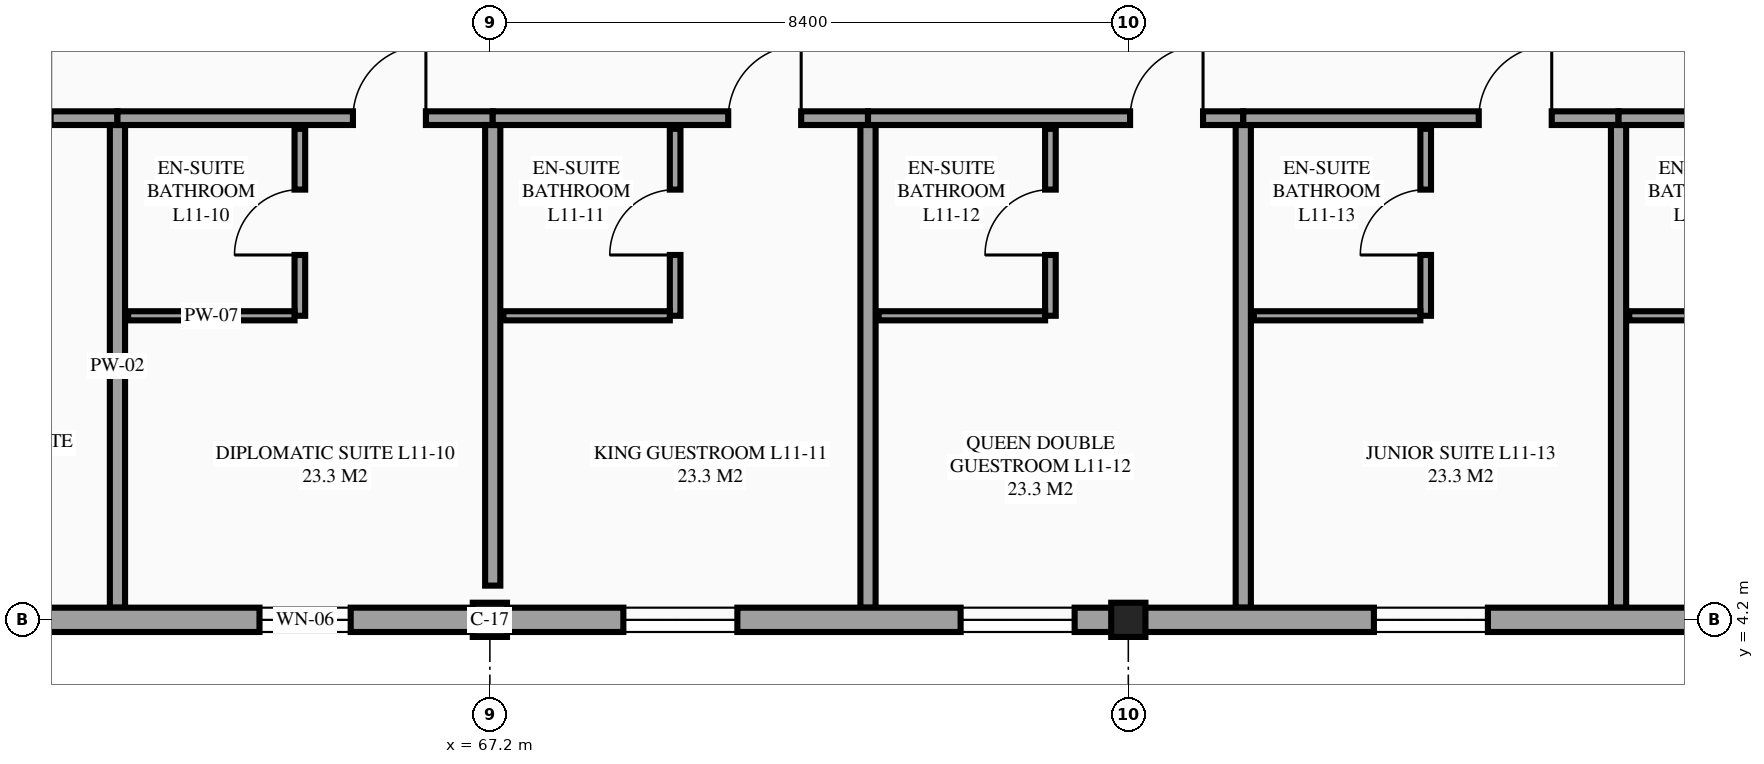
"""IFC4 building model, lengths in metres.
Left out: names, types, materials, properties, quantities, classifications, styles, units other than length and angle.
Written with IfcOpenShell. Run it as: python <this file> out.ifc"""

import sys

from ifc_helpers import new_model, si_unit, direction, frame, frame_2d, origin, origin_2d, place, context, subcontext, project, spatial, rectangle, extrude, element, fill, save


model = new_model("IFC4")
c1 = context("Model", 3, precision=1e-05, world=origin(), true_north=direction((0.0, 1.0)))
c2 = subcontext(c1, "Body", "Model", "MODEL_VIEW")
j1 = project(units=[si_unit("LENGTHUNIT", "METRE"), si_unit("PLANEANGLEUNIT", "RADIAN")], contexts=[c1])
p1 = place(None, origin())
s1 = spatial("IfcSite", under=j1, at=p1, CompositionType="ELEMENT")
p2 = place(p1, origin())
s2 = spatial("IfcBuilding", under=s1, at=p2, CompositionType="ELEMENT")
p3 = place(p2, frame((0.0, 0.0, 43.5)))
s3 = spatial("IfcBuildingStorey", under=s2, at=p3, CompositionType="ELEMENT", Elevation=43.5)
for number, where, z_axis, x_axis in (
    (1, (67.2, 4.2, 0.0), (0.0, 0.0, 1.0), (1.0, 0.0, 0.0)),
    (2, (75.6, 4.2, 0.0), (0.0, 0.0, 1.0), (1.0, 0.0, 0.0)),
):
    element("IfcColumn", number, at=place(p3, frame(where, z_axis=z_axis, x_axis=x_axis)), inside=s3, PredefinedType="COLUMN", context=c2, shape_type="SweptSolid", body=[
        extrude(rectangle(XDim=0.45, YDim=0.45, at=origin_2d()), origin(), (0.0, 0.0, 1.0), 3.6),
    ])
p4 = place(p3, frame((57.363, 10.8, 0.0), z_axis=(0.0, 0.0, 1.0), x_axis=(1.0, 0.0, 0.0)))
e3 = element("IfcWall", 3, at=p4, inside=s3, PredefinedType="PARTITIONING", context=c2, shape_type="SweptSolid", body=[
    extrude(rectangle(XDim=4.938, YDim=0.18, at=frame_2d((2.469, 0.0))), origin(), (0.0, 0.0, 1.0), 3.355),
])
p5 = place(p4, frame((3.098, 0.0, 0.0)))
e4 = element("IfcOpeningElement", 4, at=p5, cuts=e3, PredefinedType="OPENING", context=c2, shape_type="SweptSolid", body=[
    extrude(rectangle(XDim=0.96, YDim=2.15, at=frame_2d((0.48, 1.075))), frame((0.0, 0.1, 0.0), z_axis=(0.0, -1.0, 0.0), x_axis=(1.0, 0.0, 0.0)), (0.0, 0.0, 1.0), 0.2),
])
p6 = place(p3, frame((62.3, 4.36, 0.0), z_axis=(0.0, 0.0, 1.0), x_axis=(0.0, 1.0, 0.0)))
e5 = element("IfcWall", 5, at=p6, inside=s3, PredefinedType="PARTITIONING", context=c2, shape_type="SweptSolid", body=[
    extrude(rectangle(XDim=6.35, YDim=0.2, at=frame_2d((3.175, 0.0))), origin(), (0.0, 0.0, 1.0), 3.355),
])
p7 = place(p3, frame((62.3, 10.8, 0.0), z_axis=(0.0, 0.0, 1.0), x_axis=(1.0, 0.0, 0.0)))
e6 = element("IfcWall", 6, at=p7, inside=s3, PredefinedType="PARTITIONING", context=c2, shape_type="SweptSolid", body=[
    extrude(rectangle(XDim=4.938, YDim=0.18, at=frame_2d((2.469, 0.0))), origin(), (0.0, 0.0, 1.0), 3.355),
])
p8 = place(p7, frame((3.098, 0.0, 0.0)))
e7 = element("IfcOpeningElement", 7, at=p8, cuts=e6, PredefinedType="OPENING", context=c2, shape_type="SweptSolid", body=[
    extrude(rectangle(XDim=0.96, YDim=2.15, at=frame_2d((0.48, 1.075))), frame((0.0, 0.1, 0.0), z_axis=(0.0, -1.0, 0.0), x_axis=(1.0, 0.0, 0.0)), (0.0, 0.0, 1.0), 0.2),
])
p9 = place(p3, frame((67.238, 4.65, 0.0), z_axis=(0.0, 0.0, 1.0), x_axis=(0.0, 1.0, 0.0)))
e8 = element("IfcWall", 8, at=p9, inside=s3, PredefinedType="PARTITIONING", context=c2, shape_type="SweptSolid", body=[
    extrude(rectangle(XDim=6.06, YDim=0.2, at=frame_2d((3.03, 0.0))), origin(), (0.0, 0.0, 1.0), 2.41),
])
p10 = place(p3, frame((64.7, 8.2, 0.0), z_axis=(0.0, 0.0, 1.0), x_axis=(0.0, 1.0, 0.0)))
e9 = element("IfcWall", 9, at=p10, inside=s3, PredefinedType="PARTITIONING", context=c2, shape_type="SweptSolid", body=[
    extrude(rectangle(XDim=2.46, YDim=0.14, at=frame_2d((1.23, 0.0))), origin(), (0.0, 0.0, 1.0), 3.355),
])
p11 = place(p10, frame((0.8, 0.0, 0.0)))
e10 = element("IfcOpeningElement", 10, at=p11, cuts=e9, PredefinedType="OPENING", context=c2, shape_type="SweptSolid", body=[
    extrude(rectangle(XDim=0.86, YDim=2.1, at=frame_2d((0.43, 1.05))), frame((0.0, 0.08, 0.0), z_axis=(0.0, -1.0, 0.0), x_axis=(1.0, 0.0, 0.0)), (0.0, 0.0, 1.0), 0.16),
])
p12 = place(p3, frame((62.44, 8.2, 0.0), z_axis=(0.0, 0.0, 1.0), x_axis=(1.0, 0.0, 0.0)))
e11 = element("IfcWall", 11, at=p12, inside=s3, PredefinedType="PARTITIONING", context=c2, shape_type="SweptSolid", body=[
    extrude(rectangle(XDim=2.19, YDim=0.12, at=frame_2d((1.095, 0.0))), origin(), (0.0, 0.0, 1.0), 3.355),
])
p13 = place(p3, frame((67.238, 10.8, 0.0), z_axis=(0.0, 0.0, 1.0), x_axis=(1.0, 0.0, 0.0)))
e12 = element("IfcWall", 12, at=p13, inside=s3, PredefinedType="PARTITIONING", context=c2, shape_type="SweptSolid", body=[
    extrude(rectangle(XDim=4.938, YDim=0.18, at=frame_2d((2.469, 0.0))), origin(), (0.0, 0.0, 1.0), 3.355),
])
p14 = place(p13, frame((3.098, 0.0, 0.0)))
e13 = element("IfcOpeningElement", 13, at=p14, cuts=e12, PredefinedType="OPENING", context=c2, shape_type="SweptSolid", body=[
    extrude(rectangle(XDim=0.96, YDim=2.15, at=frame_2d((0.48, 1.075))), frame((0.0, 0.1, 0.0), z_axis=(0.0, -1.0, 0.0), x_axis=(1.0, 0.0, 0.0)), (0.0, 0.0, 1.0), 0.2),
])
p15 = place(p3, frame((72.175, 4.36, 0.0), z_axis=(0.0, 0.0, 1.0), x_axis=(0.0, 1.0, 0.0)))
e14 = element("IfcWall", 14, at=p15, inside=s3, PredefinedType="PARTITIONING", context=c2, shape_type="SweptSolid", body=[
    extrude(rectangle(XDim=6.35, YDim=0.2, at=frame_2d((3.175, 0.0))), origin(), (0.0, 0.0, 1.0), 3.355),
])
p16 = place(p3, frame((69.637, 8.2, 0.0), z_axis=(0.0, 0.0, 1.0), x_axis=(0.0, 1.0, 0.0)))
e15 = element("IfcWall", 15, at=p16, inside=s3, PredefinedType="PARTITIONING", context=c2, shape_type="SweptSolid", body=[
    extrude(rectangle(XDim=2.46, YDim=0.14, at=frame_2d((1.23, 0.0))), origin(), (0.0, 0.0, 1.0), 3.355),
])
p17 = place(p16, frame((0.8, 0.0, 0.0)))
e16 = element("IfcOpeningElement", 16, at=p17, cuts=e15, PredefinedType="OPENING", context=c2, shape_type="SweptSolid", body=[
    extrude(rectangle(XDim=0.86, YDim=2.1, at=frame_2d((0.43, 1.05))), frame((0.0, 0.08, 0.0), z_axis=(0.0, -1.0, 0.0), x_axis=(1.0, 0.0, 0.0)), (0.0, 0.0, 1.0), 0.16),
])
p18 = place(p3, frame((67.377, 8.2, 0.0), z_axis=(0.0, 0.0, 1.0), x_axis=(1.0, 0.0, 0.0)))
e17 = element("IfcWall", 17, at=p18, inside=s3, PredefinedType="PARTITIONING", context=c2, shape_type="SweptSolid", body=[
    extrude(rectangle(XDim=2.19, YDim=0.12, at=frame_2d((1.095, 0.0))), origin(), (0.0, 0.0, 1.0), 3.355),
])
p19 = place(p3, frame((72.175, 10.8, 0.0), z_axis=(0.0, 0.0, 1.0), x_axis=(1.0, 0.0, 0.0)))
e18 = element("IfcWall", 18, at=p19, inside=s3, PredefinedType="PARTITIONING", context=c2, shape_type="SweptSolid", body=[
    extrude(rectangle(XDim=4.938, YDim=0.18, at=frame_2d((2.469, 0.0))), origin(), (0.0, 0.0, 1.0), 3.355),
])
p20 = place(p19, frame((3.448, 0.0, 0.0)))
e19 = element("IfcOpeningElement", 19, at=p20, cuts=e18, PredefinedType="OPENING", context=c2, shape_type="SweptSolid", body=[
    extrude(rectangle(XDim=0.96, YDim=2.15, at=frame_2d((0.48, 1.075))), frame((0.0, 0.1, 0.0), z_axis=(0.0, -1.0, 0.0), x_axis=(1.0, 0.0, 0.0)), (0.0, 0.0, 1.0), 0.2),
])
p21 = place(p3, frame((77.113, 4.36, 0.0), z_axis=(0.0, 0.0, 1.0), x_axis=(0.0, 1.0, 0.0)))
e20 = element("IfcWall", 20, at=p21, inside=s3, PredefinedType="PARTITIONING", context=c2, shape_type="SweptSolid", body=[
    extrude(rectangle(XDim=6.35, YDim=0.2, at=frame_2d((3.175, 0.0))), origin(), (0.0, 0.0, 1.0), 3.355),
])
p22 = place(p3, frame((74.575, 8.2, 0.0), z_axis=(0.0, 0.0, 1.0), x_axis=(0.0, 1.0, 0.0)))
e21 = element("IfcWall", 21, at=p22, inside=s3, PredefinedType="PARTITIONING", context=c2, shape_type="SweptSolid", body=[
    extrude(rectangle(XDim=2.46, YDim=0.14, at=frame_2d((1.23, 0.0))), origin(), (0.0, 0.0, 1.0), 3.355),
])
p23 = place(p22, frame((0.8, 0.0, 0.0)))
e22 = element("IfcOpeningElement", 22, at=p23, cuts=e21, PredefinedType="OPENING", context=c2, shape_type="SweptSolid", body=[
    extrude(rectangle(XDim=0.86, YDim=2.1, at=frame_2d((0.43, 1.05))), frame((0.0, 0.08, 0.0), z_axis=(0.0, -1.0, 0.0), x_axis=(1.0, 0.0, 0.0)), (0.0, 0.0, 1.0), 0.16),
])
p24 = place(p3, frame((72.315, 8.2, 0.0), z_axis=(0.0, 0.0, 1.0), x_axis=(1.0, 0.0, 0.0)))
e23 = element("IfcWall", 23, at=p24, inside=s3, PredefinedType="PARTITIONING", context=c2, shape_type="SweptSolid", body=[
    extrude(rectangle(XDim=2.19, YDim=0.12, at=frame_2d((1.095, 0.0))), origin(), (0.0, 0.0, 1.0), 3.355),
])
p25 = place(p3, frame((77.113, 10.8, 0.0), z_axis=(0.0, 0.0, 1.0), x_axis=(1.0, 0.0, 0.0)))
e24 = element("IfcWall", 24, at=p25, inside=s3, PredefinedType="PARTITIONING", context=c2, shape_type="SweptSolid", body=[
    extrude(rectangle(XDim=4.938, YDim=0.18, at=frame_2d((2.469, 0.0))), origin(), (0.0, 0.0, 1.0), 3.355),
])
p26 = place(p25, frame((3.098, 0.0, 0.0)))
e25 = element("IfcOpeningElement", 25, at=p26, cuts=e24, PredefinedType="OPENING", context=c2, shape_type="SweptSolid", body=[
    extrude(rectangle(XDim=0.96, YDim=2.15, at=frame_2d((0.48, 1.075))), frame((0.0, 0.1, 0.0), z_axis=(0.0, -1.0, 0.0), x_axis=(1.0, 0.0, 0.0)), (0.0, 0.0, 1.0), 0.2),
])
p27 = place(p3, frame((82.05, 4.36, 0.0), z_axis=(0.0, 0.0, 1.0), x_axis=(0.0, 1.0, 0.0)))
e26 = element("IfcWall", 26, at=p27, inside=s3, PredefinedType="PARTITIONING", context=c2, shape_type="SweptSolid", body=[
    extrude(rectangle(XDim=6.35, YDim=0.2, at=frame_2d((3.175, 0.0))), origin(), (0.0, 0.0, 1.0), 3.355),
])
p28 = place(p3, frame((79.512, 8.2, 0.0), z_axis=(0.0, 0.0, 1.0), x_axis=(0.0, 1.0, 0.0)))
e27 = element("IfcWall", 27, at=p28, inside=s3, PredefinedType="PARTITIONING", context=c2, shape_type="SweptSolid", body=[
    extrude(rectangle(XDim=2.46, YDim=0.14, at=frame_2d((1.23, 0.0))), origin(), (0.0, 0.0, 1.0), 3.355),
])
p29 = place(p28, frame((0.8, 0.0, 0.0)))
e28 = element("IfcOpeningElement", 28, at=p29, cuts=e27, PredefinedType="OPENING", context=c2, shape_type="SweptSolid", body=[
    extrude(rectangle(XDim=0.86, YDim=2.1, at=frame_2d((0.43, 1.05))), frame((0.0, 0.08, 0.0), z_axis=(0.0, -1.0, 0.0), x_axis=(1.0, 0.0, 0.0)), (0.0, 0.0, 1.0), 0.16),
])
p30 = place(p3, frame((77.252, 8.2, 0.0), z_axis=(0.0, 0.0, 1.0), x_axis=(1.0, 0.0, 0.0)))
e29 = element("IfcWall", 29, at=p30, inside=s3, PredefinedType="PARTITIONING", context=c2, shape_type="SweptSolid", body=[
    extrude(rectangle(XDim=2.19, YDim=0.12, at=frame_2d((1.095, 0.0))), origin(), (0.0, 0.0, 1.0), 3.355),
])
p31 = place(p3, frame((82.05, 10.8, 0.0), z_axis=(0.0, 0.0, 1.0), x_axis=(1.0, 0.0, 0.0)))
e30 = element("IfcWall", 30, at=p31, inside=s3, PredefinedType="PARTITIONING", context=c2, shape_type="SweptSolid", body=[
    extrude(rectangle(XDim=4.938, YDim=0.18, at=frame_2d((2.469, 0.0))), origin(), (0.0, 0.0, 1.0), 3.355),
])
p32 = place(p31, frame((3.448, 0.0, 0.0)))
e31 = element("IfcOpeningElement", 31, at=p32, cuts=e30, PredefinedType="OPENING", context=c2, shape_type="SweptSolid", body=[
    extrude(rectangle(XDim=0.96, YDim=2.15, at=frame_2d((0.48, 1.075))), frame((0.0, 0.1, 0.0), z_axis=(0.0, -1.0, 0.0), x_axis=(1.0, 0.0, 0.0)), (0.0, 0.0, 1.0), 0.2),
])
p33 = place(p3, frame((82.19, 8.2, 0.0), z_axis=(0.0, 0.0, 1.0), x_axis=(1.0, 0.0, 0.0)))
e32 = element("IfcWall", 32, at=p33, inside=s3, PredefinedType="PARTITIONING", context=c2, shape_type="SweptSolid", body=[
    extrude(rectangle(XDim=2.19, YDim=0.12, at=frame_2d((1.095, 0.0))), origin(), (0.0, 0.0, 1.0), 3.355),
])
p34 = place(p3, frame((58.8, 4.2, 0.0), z_axis=(0.0, 0.0, 1.0), x_axis=(1.0, 0.0, 0.0)))
e33 = element("IfcWall", 33, at=p34, inside=s3, PredefinedType="STANDARD", context=c2, shape_type="SweptSolid", body=[
    extrude(rectangle(XDim=8.4, YDim=0.32, at=frame_2d((4.2, 0.0))), origin(), (0.0, 0.0, 1.0), 2.86),
])
p35 = place(p34, frame((0.781, 0.0, 0.85)))
e34 = element("IfcOpeningElement", 34, at=p35, cuts=e33, PredefinedType="OPENING", context=c2, shape_type="SweptSolid", body=[
    extrude(rectangle(XDim=1.5, YDim=1.5, at=frame_2d((0.75, 0.75))), frame((0.0, 0.17, 0.0), z_axis=(0.0, -1.0, 0.0), x_axis=(1.0, 0.0, 0.0)), (0.0, 0.0, 1.0), 0.34),
])
p36 = place(p34, frame((5.369, 0.0, 0.85)))
e35 = element("IfcOpeningElement", 35, at=p36, cuts=e33, PredefinedType="OPENING", context=c2, shape_type="SweptSolid", body=[
    extrude(rectangle(XDim=1.2, YDim=1.5, at=frame_2d((0.6, 0.75))), frame((0.0, 0.17, 0.0), z_axis=(0.0, -1.0, 0.0), x_axis=(1.0, 0.0, 0.0)), (0.0, 0.0, 1.0), 0.34),
])
p37 = place(p3, frame((67.2, 4.2, 0.0), z_axis=(0.0, 0.0, 1.0), x_axis=(1.0, 0.0, 0.0)))
e36 = element("IfcWall", 36, at=p37, inside=s3, PredefinedType="STANDARD", context=c2, shape_type="SweptSolid", body=[
    extrude(rectangle(XDim=16.8, YDim=0.32, at=frame_2d((8.4, 0.0))), origin(), (0.0, 0.0, 1.0), 2.61),
])
p38 = place(p37, frame((1.756, 0.0, 0.85)))
e37 = element("IfcOpeningElement", 37, at=p38, cuts=e36, PredefinedType="OPENING", context=c2, shape_type="SweptSolid", body=[
    extrude(rectangle(XDim=1.5, YDim=1.5, at=frame_2d((0.75, 0.75))), frame((0.0, 0.17, 0.0), z_axis=(0.0, -1.0, 0.0), x_axis=(1.0, 0.0, 0.0)), (0.0, 0.0, 1.0), 0.34),
])
p39 = place(p37, frame((6.194, 0.0, 0.85)))
e38 = element("IfcOpeningElement", 38, at=p39, cuts=e36, PredefinedType="OPENING", context=c2, shape_type="SweptSolid", body=[
    extrude(rectangle(XDim=1.5, YDim=1.5, at=frame_2d((0.75, 0.75))), frame((0.0, 0.17, 0.0), z_axis=(0.0, -1.0, 0.0), x_axis=(1.0, 0.0, 0.0)), (0.0, 0.0, 1.0), 0.34),
])
p40 = place(p37, frame((11.631, 0.0, 0.85)))
e39 = element("IfcOpeningElement", 39, at=p40, cuts=e36, PredefinedType="OPENING", context=c2, shape_type="SweptSolid", body=[
    extrude(rectangle(XDim=1.5, YDim=1.5, at=frame_2d((0.75, 0.75))), frame((0.0, 0.17, 0.0), z_axis=(0.0, -1.0, 0.0), x_axis=(1.0, 0.0, 0.0)), (0.0, 0.0, 1.0), 0.34),
])
p41 = place(p36, origin())
e40 = element("IfcWindow", 40, at=p41, inside=s3, PartitioningType="SINGLE_PANEL", PredefinedType="WINDOW", context=c2, shape_type="SweptSolid", body=[
    extrude(rectangle(XDim=1.2, YDim=1.5, at=frame_2d((0.6, 0.75))), frame((0.0, 0.03, 0.0), z_axis=(0.0, -1.0, 0.0), x_axis=(1.0, 0.0, 0.0)), (0.0, 0.0, 1.0), 0.06),
])
fill(e35, e40)
p42 = place(p38, origin())
e41 = element("IfcWindow", 41, at=p42, inside=s3, PartitioningType="SINGLE_PANEL", PredefinedType="WINDOW", context=c2, shape_type="SweptSolid", body=[
    extrude(rectangle(XDim=1.5, YDim=1.5, at=frame_2d((0.75, 0.75))), frame((0.0, 0.03, 0.0), z_axis=(0.0, -1.0, 0.0), x_axis=(1.0, 0.0, 0.0)), (0.0, 0.0, 1.0), 0.06),
])
fill(e37, e41)
p43 = place(p39, origin())
e42 = element("IfcWindow", 42, at=p43, inside=s3, PartitioningType="SINGLE_PANEL", PredefinedType="WINDOW", context=c2, shape_type="SweptSolid", body=[
    extrude(rectangle(XDim=1.5, YDim=1.5, at=frame_2d((0.75, 0.75))), frame((0.0, 0.03, 0.0), z_axis=(0.0, -1.0, 0.0), x_axis=(1.0, 0.0, 0.0)), (0.0, 0.0, 1.0), 0.06),
])
fill(e38, e42)
p44 = place(p40, origin())
e43 = element("IfcWindow", 43, at=p44, inside=s3, PartitioningType="SINGLE_PANEL", PredefinedType="WINDOW", context=c2, shape_type="SweptSolid", body=[
    extrude(rectangle(XDim=1.5, YDim=1.5, at=frame_2d((0.75, 0.75))), frame((0.0, 0.03, 0.0), z_axis=(0.0, -1.0, 0.0), x_axis=(1.0, 0.0, 0.0)), (0.0, 0.0, 1.0), 0.06),
])
fill(e39, e43)
p45 = place(p8, origin())
e44 = element("IfcDoor", 44, at=p45, inside=s3, OperationType="SINGLE_SWING_RIGHT", PredefinedType="DOOR", context=c2, shape_type="SweptSolid", body=[
    extrude(rectangle(XDim=0.96, YDim=2.15, at=frame_2d((0.48, 1.075))), frame((0.0, 0.025, 0.0), z_axis=(0.0, -1.0, 0.0), x_axis=(1.0, 0.0, 0.0)), (0.0, 0.0, 1.0), 0.05),
])
fill(e7, e44)
p46 = place(p11, origin())
e45 = element("IfcDoor", 45, at=p46, inside=s3, OperationType="SINGLE_SWING_LEFT", PredefinedType="DOOR", context=c2, shape_type="SweptSolid", body=[
    extrude(rectangle(XDim=0.86, YDim=2.1, at=frame_2d((0.43, 1.05))), frame((0.0, 0.025, 0.0), z_axis=(0.0, -1.0, 0.0), x_axis=(1.0, 0.0, 0.0)), (0.0, 0.0, 1.0), 0.05),
])
fill(e10, e45)
p47 = place(p14, origin())
e46 = element("IfcDoor", 46, at=p47, inside=s3, OperationType="SINGLE_SWING_RIGHT", PredefinedType="DOOR", context=c2, shape_type="SweptSolid", body=[
    extrude(rectangle(XDim=0.96, YDim=2.15, at=frame_2d((0.48, 1.075))), frame((0.0, 0.025, 0.0), z_axis=(0.0, -1.0, 0.0), x_axis=(1.0, 0.0, 0.0)), (0.0, 0.0, 1.0), 0.05),
])
fill(e13, e46)
p48 = place(p17, origin())
e47 = element("IfcDoor", 47, at=p48, inside=s3, OperationType="SINGLE_SWING_LEFT", PredefinedType="DOOR", context=c2, shape_type="SweptSolid", body=[
    extrude(rectangle(XDim=0.86, YDim=2.1, at=frame_2d((0.43, 1.05))), frame((0.0, 0.025, 0.0), z_axis=(0.0, -1.0, 0.0), x_axis=(1.0, 0.0, 0.0)), (0.0, 0.0, 1.0), 0.05),
])
fill(e16, e47)
p49 = place(p20, origin())
e48 = element("IfcDoor", 48, at=p49, inside=s3, OperationType="SINGLE_SWING_RIGHT", PredefinedType="DOOR", context=c2, shape_type="SweptSolid", body=[
    extrude(rectangle(XDim=0.96, YDim=2.15, at=frame_2d((0.48, 1.075))), frame((0.0, 0.025, 0.0), z_axis=(0.0, -1.0, 0.0), x_axis=(1.0, 0.0, 0.0)), (0.0, 0.0, 1.0), 0.05),
])
fill(e19, e48)
p50 = place(p23, origin())
e49 = element("IfcDoor", 49, at=p50, inside=s3, OperationType="SINGLE_SWING_LEFT", PredefinedType="DOOR", context=c2, shape_type="SweptSolid", body=[
    extrude(rectangle(XDim=0.86, YDim=2.1, at=frame_2d((0.43, 1.05))), frame((0.0, 0.025, 0.0), z_axis=(0.0, -1.0, 0.0), x_axis=(1.0, 0.0, 0.0)), (0.0, 0.0, 1.0), 0.05),
])
fill(e22, e49)
p51 = place(p26, origin())
e50 = element("IfcDoor", 50, at=p51, inside=s3, OperationType="SINGLE_SWING_RIGHT", PredefinedType="DOOR", context=c2, shape_type="SweptSolid", body=[
    extrude(rectangle(XDim=0.96, YDim=2.15, at=frame_2d((0.48, 1.075))), frame((0.0, 0.025, 0.0), z_axis=(0.0, -1.0, 0.0), x_axis=(1.0, 0.0, 0.0)), (0.0, 0.0, 1.0), 0.05),
])
fill(e25, e50)
p52 = place(p29, origin())
e51 = element("IfcDoor", 51, at=p52, inside=s3, OperationType="SINGLE_SWING_LEFT", PredefinedType="DOOR", context=c2, shape_type="SweptSolid", body=[
    extrude(rectangle(XDim=0.86, YDim=2.1, at=frame_2d((0.43, 1.05))), frame((0.0, 0.025, 0.0), z_axis=(0.0, -1.0, 0.0), x_axis=(1.0, 0.0, 0.0)), (0.0, 0.0, 1.0), 0.05),
])
fill(e28, e51)
save(model, sys.argv[1])
